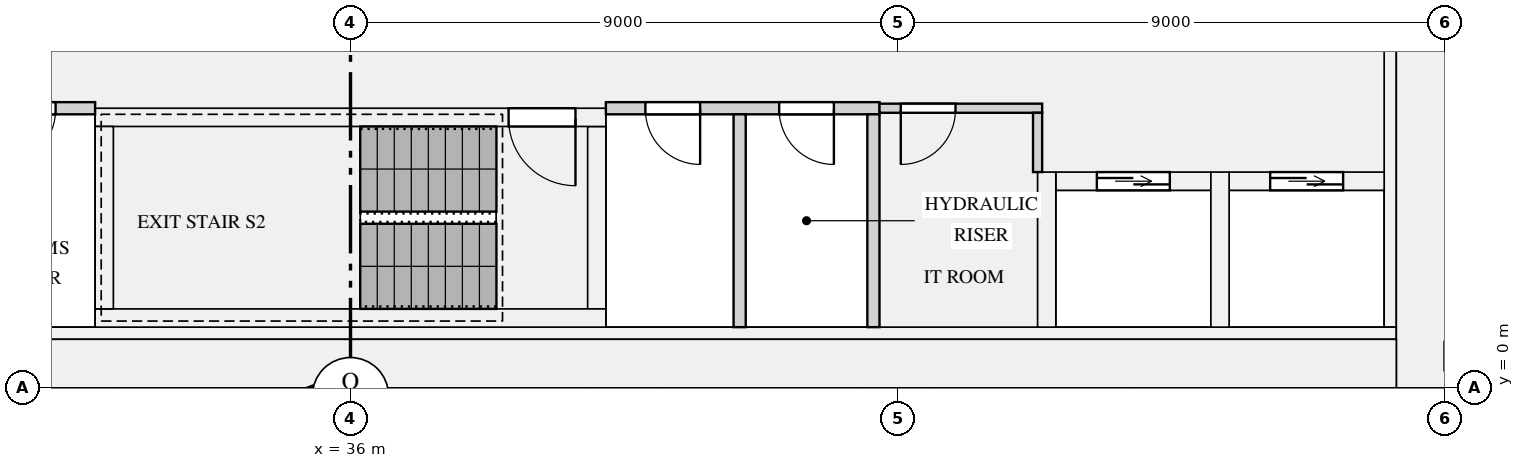
"""IFC4 building model, lengths in metres.
Left out: names, types, materials, properties, quantities, classifications, styles, units other than length and angle.
Written with IfcOpenShell. Run it as: python <this file> out.ifc"""

import sys

from ifc_helpers import new_model, si_unit, direction, frame, frame_2d, origin, place, context, subcontext, project, spatial, rectangle, extrude, element, fill, save


model = new_model("IFC4")
c1 = context("Model", 3, precision=1e-05, world=origin(), true_north=direction((0.0, 1.0)))
c2 = subcontext(c1, "Body", "Model", "MODEL_VIEW")
j1 = project(units=[si_unit("LENGTHUNIT", "METRE"), si_unit("PLANEANGLEUNIT", "RADIAN")], contexts=[c1])
p1 = place(None, origin())
s1 = spatial("IfcSite", under=j1, at=p1, CompositionType="ELEMENT")
p2 = place(p1, origin())
s2 = spatial("IfcBuilding", under=s1, at=p2, CompositionType="ELEMENT")
p3 = place(p2, frame((0.0, 0.0, 111.9)))
s3 = spatial("IfcBuildingStorey", under=s2, at=p3, CompositionType="ELEMENT", Elevation=111.9)
p4 = place(p3, frame((53.6, 0.0, 0.0), z_axis=(0.0, 0.0, 1.0), x_axis=(0.0, 1.0, 0.0)))
e1 = element("IfcWall", 1, at=p4, inside=s3, PredefinedType="SHEAR", context=c2, shape_type="SweptSolid", body=[
    extrude(rectangle(XDim=12.5, YDim=0.8, at=frame_2d((6.25, 0.0))), origin(), (0.0, 0.0, 1.0), 3.15),
])
p5 = place(p3, frame((18.8, 0.4, 0.0), z_axis=(0.0, 0.0, 1.0), x_axis=(1.0, 0.0, 0.0)))
e2 = element("IfcWall", 2, at=p5, inside=s3, PredefinedType="SHEAR", context=c2, shape_type="SweptSolid", body=[
    extrude(rectangle(XDim=34.4, YDim=0.8, at=frame_2d((17.2, 0.0))), origin(), (0.0, 0.0, 1.0), 3.15),
])
p6 = place(p3, frame((53.1, 1.0, 0.0), z_axis=(0.0, 0.0, 1.0), x_axis=(0.0, 1.0, 0.0)))
e3 = element("IfcWall", 3, at=p6, inside=s3, PredefinedType="SHEAR", context=c2, shape_type="SweptSolid", body=[
    extrude(rectangle(XDim=10.9, YDim=0.2, at=frame_2d((5.45, 0.0))), origin(), (0.0, 0.0, 1.0), 3.15),
])
p7 = place(p3, frame((18.8, 0.9, 0.0), z_axis=(0.0, 0.0, 1.0), x_axis=(1.0, 0.0, 0.0)))
e4 = element("IfcWall", 4, at=p7, inside=s3, PredefinedType="SHEAR", context=c2, shape_type="SweptSolid", body=[
    extrude(rectangle(XDim=34.4, YDim=0.2, at=frame_2d((17.2, 0.0))), origin(), (0.0, 0.0, 1.0), 3.15),
])
p8 = place(p3, frame((47.6, 3.4, 0.0), z_axis=(0.0, 0.0, 1.0), x_axis=(1.0, 0.0, 0.0)))
e5 = element("IfcWall", 5, at=p8, inside=s3, PredefinedType="SHEAR", context=c2, shape_type="SweptSolid", body=[
    extrude(rectangle(XDim=2.55, YDim=0.3, at=frame_2d((1.275, 0.0))), origin(), (0.0, 0.0, 1.0), 3.15),
])
p9 = place(p8, frame((0.675, 0.0, 0.0)))
e6 = element("IfcOpeningElement", 6, at=p9, cuts=e5, PredefinedType="OPENING", context=c2, shape_type="SweptSolid", body=[
    extrude(rectangle(XDim=1.2, YDim=2.1, at=frame_2d((0.6, 1.05))), frame((0.0, 0.16, 0.0), z_axis=(0.0, -1.0, 0.0), x_axis=(1.0, 0.0, 0.0)), (0.0, 0.0, 1.0), 0.32),
])
p10 = place(p3, frame((47.45, 1.0, 0.0), z_axis=(0.0, 0.0, 1.0), x_axis=(0.0, 1.0, 0.0)))
e7 = element("IfcWall", 7, at=p10, inside=s3, PredefinedType="SHEAR", context=c2, shape_type="SweptSolid", body=[
    extrude(rectangle(XDim=2.55, YDim=0.3, at=frame_2d((1.275, 0.0))), origin(), (0.0, 0.0, 1.0), 3.15),
])
p11 = place(p3, frame((50.45, 3.4, 0.0), z_axis=(0.0, 0.0, 1.0), x_axis=(1.0, 0.0, 0.0)))
e8 = element("IfcWall", 8, at=p11, inside=s3, PredefinedType="SHEAR", context=c2, shape_type="SweptSolid", body=[
    extrude(rectangle(XDim=2.55, YDim=0.3, at=frame_2d((1.275, 0.0))), origin(), (0.0, 0.0, 1.0), 3.15),
])
p12 = place(p11, frame((0.675, 0.0, 0.0)))
e9 = element("IfcOpeningElement", 9, at=p12, cuts=e8, PredefinedType="OPENING", context=c2, shape_type="SweptSolid", body=[
    extrude(rectangle(XDim=1.2, YDim=2.1, at=frame_2d((0.6, 1.05))), frame((0.0, 0.16, 0.0), z_axis=(0.0, -1.0, 0.0), x_axis=(1.0, 0.0, 0.0)), (0.0, 0.0, 1.0), 0.32),
])
p13 = place(p3, frame((50.3, 1.0, 0.0), z_axis=(0.0, 0.0, 1.0), x_axis=(0.0, 1.0, 0.0)))
e10 = element("IfcWall", 10, at=p13, inside=s3, PredefinedType="SHEAR", context=c2, shape_type="SweptSolid", body=[
    extrude(rectangle(XDim=2.55, YDim=0.3, at=frame_2d((1.275, 0.0))), origin(), (0.0, 0.0, 1.0), 3.15),
])
p14 = place(p3, frame((31.8, 1.15, 0.0), z_axis=(0.0, 0.0, 1.0), x_axis=(1.0, 0.0, 0.0)))
e11 = element("IfcWall", 11, at=p14, inside=s3, PredefinedType="SHEAR", context=c2, shape_type="SweptSolid", body=[
    extrude(rectangle(XDim=8.4, YDim=0.3, at=frame_2d((4.2, 0.0))), origin(), (0.0, 0.0, 1.0), 3.15),
])
p15 = place(p3, frame((31.8, 4.45, 0.0), z_axis=(0.0, 0.0, 1.0), x_axis=(1.0, 0.0, 0.0)))
e12 = element("IfcWall", 12, at=p15, inside=s3, PredefinedType="SHEAR", context=c2, shape_type="SweptSolid", body=[
    extrude(rectangle(XDim=8.4, YDim=0.3, at=frame_2d((4.2, 0.0))), origin(), (0.0, 0.0, 1.0), 3.15),
])
p16 = place(p15, frame((6.8, 0.0, 0.0)))
e13 = element("IfcOpeningElement", 13, at=p16, cuts=e12, PredefinedType="OPENING", context=c2, shape_type="SweptSolid", body=[
    extrude(rectangle(XDim=1.1, YDim=2.1, at=frame_2d((0.55, 1.05))), frame((0.0, 0.16, 0.0), z_axis=(0.0, -1.0, 0.0), x_axis=(1.0, 0.0, 0.0)), (0.0, 0.0, 1.0), 0.32),
])
for number, where, z_axis, x_axis in (
    (14, (31.95, 1.3, 0.0), (0.0, 0.0, 1.0), (0.0, 1.0, 0.0)),
    (15, (40.05, 1.3, 0.0), (0.0, 0.0, 1.0), (0.0, 1.0, 0.0)),
):
    element("IfcWall", number, at=place(p3, frame(where, z_axis=z_axis, x_axis=x_axis)), inside=s3, PredefinedType="SHEAR", context=c2, shape_type="SweptSolid", body=[
        extrude(rectangle(XDim=3.0, YDim=0.3, at=frame_2d((1.5, 0.0))), origin(), (0.0, 0.0, 1.0), 3.15),
    ])
p17 = place(p3, frame((27.3, 4.6, 0.0), z_axis=(0.0, 0.0, 1.0), x_axis=(1.0, 0.0, 0.0)))
e16 = element("IfcWall", 16, at=p17, inside=s3, PredefinedType="PARTITIONING", context=c2, shape_type="SweptSolid", body=[
    extrude(rectangle(XDim=4.5, YDim=0.2, at=frame_2d((2.25, 0.0))), origin(), (0.0, 0.0, 1.0), 2.83),
])
p18 = place(p17, frame((0.75, 0.0, 0.0)))
e17 = element("IfcOpeningElement", 17, at=p18, cuts=e16, PredefinedType="OPENING", context=c2, shape_type="SweptSolid", body=[
    extrude(rectangle(XDim=0.9, YDim=2.1, at=frame_2d((0.45, 1.05))), frame((0.0, 0.11, 0.0), z_axis=(0.0, -1.0, 0.0), x_axis=(1.0, 0.0, 0.0)), (0.0, 0.0, 1.0), 0.22),
])
p19 = place(p17, frame((2.95, 0.0, 0.0)))
e18 = element("IfcOpeningElement", 18, at=p19, cuts=e16, PredefinedType="OPENING", context=c2, shape_type="SweptSolid", body=[
    extrude(rectangle(XDim=0.9, YDim=2.1, at=frame_2d((0.45, 1.05))), frame((0.0, 0.11, 0.0), z_axis=(0.0, -1.0, 0.0), x_axis=(1.0, 0.0, 0.0)), (0.0, 0.0, 1.0), 0.22),
])
p20 = place(p3, frame((40.2, 4.6, 0.0), z_axis=(0.0, 0.0, 1.0), x_axis=(1.0, 0.0, 0.0)))
e19 = element("IfcWall", 19, at=p20, inside=s3, PredefinedType="PARTITIONING", context=c2, shape_type="SweptSolid", body=[
    extrude(rectangle(XDim=4.5, YDim=0.2, at=frame_2d((2.25, 0.0))), origin(), (0.0, 0.0, 1.0), 2.83),
])
p21 = place(p20, frame((0.65, 0.0, 0.0)))
e20 = element("IfcOpeningElement", 20, at=p21, cuts=e19, PredefinedType="OPENING", context=c2, shape_type="SweptSolid", body=[
    extrude(rectangle(XDim=0.9, YDim=2.1, at=frame_2d((0.45, 1.05))), frame((0.0, 0.11, 0.0), z_axis=(0.0, -1.0, 0.0), x_axis=(1.0, 0.0, 0.0)), (0.0, 0.0, 1.0), 0.22),
])
p22 = place(p20, frame((2.85, 0.0, 0.0)))
e21 = element("IfcOpeningElement", 21, at=p22, cuts=e19, PredefinedType="OPENING", context=c2, shape_type="SweptSolid", body=[
    extrude(rectangle(XDim=0.9, YDim=2.1, at=frame_2d((0.45, 1.05))), frame((0.0, 0.11, 0.0), z_axis=(0.0, -1.0, 0.0), x_axis=(1.0, 0.0, 0.0)), (0.0, 0.0, 1.0), 0.22),
])
p23 = place(p3, frame((44.7, 4.6, 0.0), z_axis=(0.0, 0.0, 1.0), x_axis=(1.0, 0.0, 0.0)))
e22 = element("IfcWall", 22, at=p23, inside=s3, PredefinedType="PARTITIONING", context=c2, shape_type="SweptSolid", body=[
    extrude(rectangle(XDim=2.675, YDim=0.15, at=frame_2d((1.337, 0.0))), origin(), (0.0, 0.0, 1.0), 2.83),
])
p24 = place(p23, frame((0.35, 0.0, 0.0)))
e23 = element("IfcOpeningElement", 23, at=p24, cuts=e22, PredefinedType="OPENING", context=c2, shape_type="SweptSolid", body=[
    extrude(rectangle(XDim=0.9, YDim=2.1, at=frame_2d((0.45, 1.05))), frame((0.0, 0.085, 0.0), z_axis=(0.0, -1.0, 0.0), x_axis=(1.0, 0.0, 0.0)), (0.0, 0.0, 1.0), 0.17),
])
for number, where, z_axis, x_axis in (
    (24, (42.4, 1.0, 0.0), (0.0, 0.0, 1.0), (0.0, 1.0, 0.0)),
    (25, (44.6, 1.0, 0.0), (0.0, 0.0, 1.0), (0.0, 1.0, 0.0)),
):
    element("IfcWall", number, at=place(p3, frame(where, z_axis=z_axis, x_axis=x_axis)), inside=s3, PredefinedType="PARTITIONING", context=c2, shape_type="SweptSolid", body=[
        extrude(rectangle(XDim=3.5, YDim=0.2, at=frame_2d((1.75, 0.0))), origin(), (0.0, 0.0, 1.0), 2.83),
    ])
p25 = place(p3, frame((47.3, 3.55, 0.0), z_axis=(0.0, 0.0, 1.0), x_axis=(0.0, 1.0, 0.0)))
e26 = element("IfcWall", 26, at=p25, inside=s3, PredefinedType="PARTITIONING", context=c2, shape_type="SweptSolid", body=[
    extrude(rectangle(XDim=0.975, YDim=0.15, at=frame_2d((0.487, 0.0))), origin(), (0.0, 0.0, 1.0), 2.83),
])
p26 = place(p9, origin())
e27 = element("IfcDoor", 27, at=p26, inside=s3, OperationType="DOUBLE_DOOR_SLIDING", PredefinedType="DOOR", context=c2, shape_type="SweptSolid", body=[
    extrude(rectangle(XDim=1.2, YDim=2.1, at=frame_2d((0.6, 1.05))), frame((0.0, 0.025, 0.0), z_axis=(0.0, -1.0, 0.0), x_axis=(1.0, 0.0, 0.0)), (0.0, 0.0, 1.0), 0.05),
])
fill(e6, e27)
p27 = place(p12, origin())
e28 = element("IfcDoor", 28, at=p27, inside=s3, OperationType="DOUBLE_DOOR_SLIDING", PredefinedType="DOOR", context=c2, shape_type="SweptSolid", body=[
    extrude(rectangle(XDim=1.2, YDim=2.1, at=frame_2d((0.6, 1.05))), frame((0.0, 0.025, 0.0), z_axis=(0.0, -1.0, 0.0), x_axis=(1.0, 0.0, 0.0)), (0.0, 0.0, 1.0), 0.05),
])
fill(e9, e28)
p28 = place(p16, frame((1.1, 0.0, 0.0), z_axis=(0.0, 0.0, 1.0), x_axis=(-1.0, 0.0, 0.0)))
e29 = element("IfcDoor", 29, at=p28, inside=s3, OperationType="SINGLE_SWING_LEFT", PredefinedType="DOOR", context=c2, shape_type="SweptSolid", body=[
    extrude(rectangle(XDim=1.1, YDim=2.1, at=frame_2d((0.55, 1.05))), frame((0.0, 0.025, 0.0), z_axis=(0.0, -1.0, 0.0), x_axis=(1.0, 0.0, 0.0)), (0.0, 0.0, 1.0), 0.05),
])
fill(e13, e29)
p29 = place(p24, frame((0.9, 0.0, 0.0), z_axis=(0.0, 0.0, 1.0), x_axis=(-1.0, 0.0, 0.0)))
e30 = element("IfcDoor", 30, at=p29, inside=s3, OperationType="SINGLE_SWING_RIGHT", PredefinedType="DOOR", context=c2, shape_type="SweptSolid", body=[
    extrude(rectangle(XDim=0.9, YDim=2.1, at=frame_2d((0.45, 1.05))), frame((0.0, 0.025, 0.0), z_axis=(0.0, -1.0, 0.0), x_axis=(1.0, 0.0, 0.0)), (0.0, 0.0, 1.0), 0.05),
])
fill(e23, e30)
p30 = place(p19, frame((0.9, 0.0, 0.0), z_axis=(0.0, 0.0, 1.0), x_axis=(-1.0, 0.0, 0.0)))
e31 = element("IfcDoor", 31, at=p30, inside=s3, OperationType="SINGLE_SWING_RIGHT", PredefinedType="DOOR", context=c2, shape_type="SweptSolid", body=[
    extrude(rectangle(XDim=0.9, YDim=2.1, at=frame_2d((0.45, 1.05))), frame((0.0, 0.025, 0.0), z_axis=(0.0, -1.0, 0.0), x_axis=(1.0, 0.0, 0.0)), (0.0, 0.0, 1.0), 0.05),
])
fill(e18, e31)
p31 = place(p21, frame((0.9, 0.0, 0.0), z_axis=(0.0, 0.0, 1.0), x_axis=(-1.0, 0.0, 0.0)))
e32 = element("IfcDoor", 32, at=p31, inside=s3, OperationType="SINGLE_SWING_LEFT", PredefinedType="DOOR", context=c2, shape_type="SweptSolid", body=[
    extrude(rectangle(XDim=0.9, YDim=2.1, at=frame_2d((0.45, 1.05))), frame((0.0, 0.025, 0.0), z_axis=(0.0, -1.0, 0.0), x_axis=(1.0, 0.0, 0.0)), (0.0, 0.0, 1.0), 0.05),
])
fill(e20, e32)
p32 = place(p22, frame((0.9, 0.0, 0.0), z_axis=(0.0, 0.0, 1.0), x_axis=(-1.0, 0.0, 0.0)))
e33 = element("IfcDoor", 33, at=p32, inside=s3, OperationType="SINGLE_SWING_LEFT", PredefinedType="DOOR", context=c2, shape_type="SweptSolid", body=[
    extrude(rectangle(XDim=0.9, YDim=2.1, at=frame_2d((0.45, 1.05))), frame((0.0, 0.025, 0.0), z_axis=(0.0, -1.0, 0.0), x_axis=(1.0, 0.0, 0.0)), (0.0, 0.0, 1.0), 0.05),
])
fill(e21, e33)
save(model, sys.argv[1])
